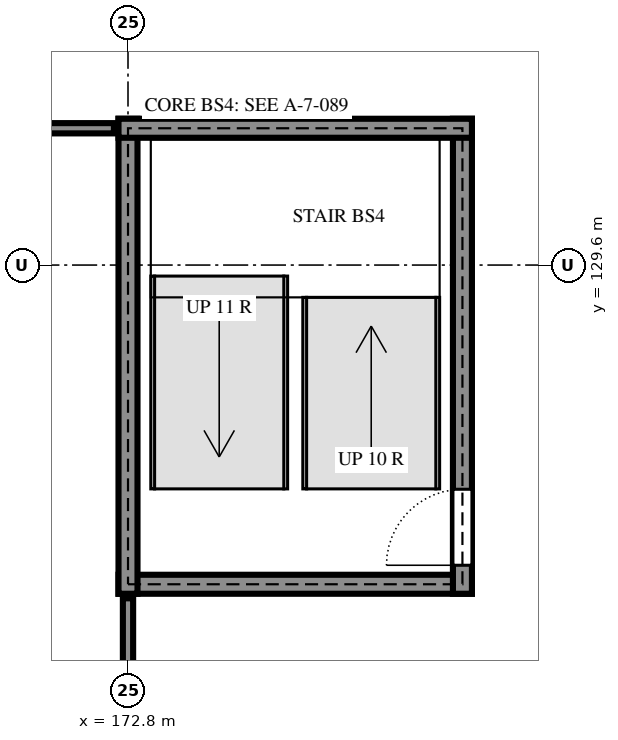
"""IFC4 building model, lengths in metres.
Left out: names, types, materials, properties, quantities, classifications, styles, units other than length and angle.
Written with IfcOpenShell. Run it as: python <this file> out.ifc"""

import sys

from ifc_helpers import new_model, si_unit, direction, frame, frame_2d, origin, place, context, subcontext, project, spatial, rectangle, extrude, element, fill, save


model = new_model("IFC4")
c1 = context("Model", 3, precision=1e-05, world=origin(), true_north=direction((0.0, 1.0)))
c2 = subcontext(c1, "Body", "Model", "MODEL_VIEW")
j1 = project(units=[si_unit("LENGTHUNIT", "METRE"), si_unit("PLANEANGLEUNIT", "RADIAN")], contexts=[c1])
p1 = place(None, origin())
s1 = spatial("IfcSite", under=j1, at=p1, CompositionType="ELEMENT")
p2 = place(p1, origin())
s2 = spatial("IfcBuilding", under=s1, at=p2, CompositionType="ELEMENT")
p3 = place(p2, frame((0.0, 0.0, 3.6)))
s3 = spatial("IfcBuildingStorey", under=s2, at=p3, CompositionType="ELEMENT", Elevation=3.6)
p4 = place(p3, frame((172.675, 125.4, 0.0), z_axis=(0.0, 0.0, 1.0), x_axis=(1.0, 0.0, 0.0)))
e1 = element("IfcWall", 1, at=p4, inside=s3, PredefinedType="SHEAR", context=c2, shape_type="SweptSolid", body=[
    extrude(rectangle(XDim=4.65, YDim=0.25, at=frame_2d((2.325, 0.0))), origin(), (0.0, 0.0, 1.0), 3.6),
])
p5 = place(p3, frame((177.2, 125.275, 0.0), z_axis=(0.0, 0.0, 1.0), x_axis=(0.0, 1.0, 0.0)))
e2 = element("IfcWall", 2, at=p5, inside=s3, PredefinedType="SHEAR", context=c2, shape_type="SweptSolid", body=[
    extrude(rectangle(XDim=6.25, YDim=0.25, at=frame_2d((3.125, 0.0))), origin(), (0.0, 0.0, 1.0), 3.6),
])
p6 = place(p5, frame((0.375, 0.0, 0.0)))
e3 = element("IfcOpeningElement", 3, at=p6, cuts=e2, PredefinedType="OPENING", context=c2, shape_type="SweptSolid", body=[
    extrude(rectangle(XDim=1.0, YDim=2.4, at=frame_2d((0.5, 1.2))), frame((0.0, 0.135, 0.0), z_axis=(0.0, -1.0, 0.0), x_axis=(1.0, 0.0, 0.0)), (0.0, 0.0, 1.0), 0.27),
])
p7 = place(p3, frame((172.8, 131.525, 0.0), z_axis=(0.0, 0.0, 1.0), x_axis=(0.0, -1.0, 0.0)))
e4 = element("IfcWall", 4, at=p7, inside=s3, PredefinedType="SHEAR", context=c2, shape_type="SweptSolid", body=[
    extrude(rectangle(XDim=6.25, YDim=0.25, at=frame_2d((3.125, 0.0))), origin(), (0.0, 0.0, 1.0), 3.6),
])
p8 = place(p3, frame((177.325, 131.4, 0.0), z_axis=(0.0, 0.0, 1.0), x_axis=(-1.0, 0.0, 0.0)))
e5 = element("IfcWall", 5, at=p8, inside=s3, PredefinedType="SHEAR", context=c2, shape_type="SweptSolid", body=[
    extrude(rectangle(XDim=4.65, YDim=0.25, at=frame_2d((2.325, 0.0))), origin(), (0.0, 0.0, 1.0), 3.6),
])
p9 = place(p3, frame((172.8, 122.55, 0.0), z_axis=(0.0, 0.0, 1.0), x_axis=(0.0, 1.0, 0.0)))
e6 = element("IfcWall", 6, at=p9, inside=s3, PredefinedType="PARTITIONING", context=c2, shape_type="SweptSolid", body=[
    extrude(rectangle(XDim=2.665, YDim=0.135, at=frame_2d((1.333, 0.0))), origin(), (0.0, 0.0, 1.0), 3.18),
])
p10 = place(p3, frame((172.615, 131.4, 0.0), z_axis=(0.0, 0.0, 1.0), x_axis=(-1.0, 0.0, 0.0)))
e7 = element("IfcWall", 7, at=p10, inside=s3, PredefinedType="PARTITIONING", context=c2, shape_type="SweptSolid", body=[
    extrude(rectangle(XDim=21.255, YDim=0.135, at=frame_2d((10.627, 0.0))), origin(), (0.0, 0.0, 1.0), 3.38),
])
p11 = place(p10, frame((10.15, 0.0, 0.0)))
e8 = element("IfcOpeningElement", 8, at=p11, cuts=e7, PredefinedType="OPENING", context=c2, shape_type="SweptSolid", body=[
    extrude(rectangle(XDim=1.0, YDim=2.4, at=frame_2d((0.5, 1.2))), frame((0.0, 0.077, 0.0), z_axis=(0.0, -1.0, 0.0), x_axis=(1.0, 0.0, 0.0)), (0.0, 0.0, 1.0), 0.155),
])
p12 = place(p6, origin())
e9 = element("IfcDoor", 9, at=p12, inside=s3, OperationType="SINGLE_SWING_RIGHT", PredefinedType="DOOR", context=c2, shape_type="SweptSolid", body=[
    extrude(rectangle(XDim=1.0, YDim=2.4, at=frame_2d((0.5, 1.2))), frame((0.0, 0.025, 0.0), z_axis=(0.0, -1.0, 0.0), x_axis=(1.0, 0.0, 0.0)), (0.0, 0.0, 1.0), 0.05),
])
fill(e3, e9)
save(model, sys.argv[1])
